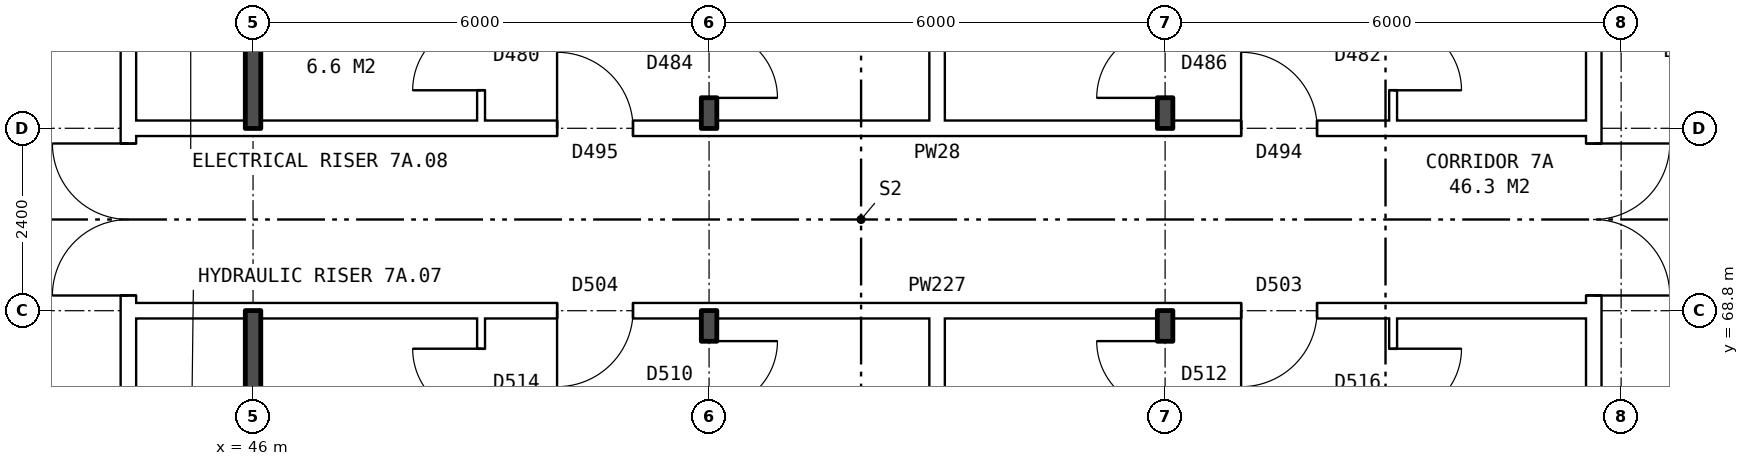
"""IFC4 building model, lengths in metres.
Left out: names, types, materials, properties, quantities, classifications, styles, units other than length and angle.
Written with IfcOpenShell. Run it as: python <this file> out.ifc"""

import sys

from ifc_helpers import new_model, si_unit, direction, frame, frame_2d, origin, place, context, subcontext, project, spatial, rectangle, extrude, element, fill, save


model = new_model("IFC4")
c1 = context("Model", 3, precision=1e-05, world=origin(), true_north=direction((0.0, 1.0)))
c2 = subcontext(c1, "Body", "Model", "MODEL_VIEW")
j1 = project(units=[si_unit("LENGTHUNIT", "METRE"), si_unit("PLANEANGLEUNIT", "RADIAN")], contexts=[c1])
p1 = place(None, origin())
s1 = spatial("IfcSite", under=j1, at=p1, CompositionType="ELEMENT")
p2 = place(p1, origin())
s2 = spatial("IfcBuilding", under=s1, at=p2, CompositionType="ELEMENT")
p3 = place(p2, frame((0.0, 0.0, 28.8)))
s3 = spatial("IfcBuildingStorey", under=s2, at=p3, CompositionType="ELEMENT", Elevation=28.8)
p4 = place(p3, frame((63.64, 63.9, 0.0), z_axis=(0.0, 0.0, 1.0), x_axis=(0.0, 1.0, 0.0)))
e1 = element("IfcWall", 1, at=p4, inside=s3, PredefinedType="PARTITIONING", context=c2, shape_type="SweptSolid", body=[
    extrude(rectangle(XDim=12.2, YDim=0.2, at=frame_2d((6.1, 0.0))), origin(), (0.0, 0.0, 1.0), 2.85),
])
p5 = place(p4, frame((5.1, 0.0, 0.0)))
e2 = element("IfcOpeningElement", 2, at=p5, cuts=e1, PredefinedType="OPENING", context=c2, shape_type="SweptSolid", body=[
    extrude(rectangle(XDim=2.0, YDim=2.1, at=frame_2d((1.0, 1.05))), frame((0.0, 0.11, 0.0), z_axis=(0.0, -1.0, 0.0), x_axis=(1.0, 0.0, 0.0)), (0.0, 0.0, 1.0), 0.22),
])
p6 = place(p3, frame((44.36, 63.9, 0.0), z_axis=(0.0, 0.0, 1.0), x_axis=(0.0, 1.0, 0.0)))
e3 = element("IfcWall", 3, at=p6, inside=s3, PredefinedType="PARTITIONING", context=c2, shape_type="SweptSolid", body=[
    extrude(rectangle(XDim=12.2, YDim=0.2, at=frame_2d((6.1, 0.0))), origin(), (0.0, 0.0, 1.0), 2.85),
])
p7 = place(p6, frame((5.1, 0.0, 0.0)))
e4 = element("IfcOpeningElement", 4, at=p7, cuts=e3, PredefinedType="OPENING", context=c2, shape_type="SweptSolid", body=[
    extrude(rectangle(XDim=2.0, YDim=2.1, at=frame_2d((1.0, 1.05))), frame((0.0, 0.11, 0.0), z_axis=(0.0, -1.0, 0.0), x_axis=(1.0, 0.0, 0.0)), (0.0, 0.0, 1.0), 0.22),
])
p8 = place(p3, frame((44.36, 68.8, 0.0), z_axis=(0.0, 0.0, 1.0), x_axis=(1.0, 0.0, 0.0)))
e5 = element("IfcWall", 5, at=p8, inside=s3, PredefinedType="PARTITIONING", context=c2, shape_type="SweptSolid", body=[
    extrude(rectangle(XDim=19.28, YDim=0.2, at=frame_2d((9.64, 0.0))), origin(), (0.0, 0.0, 1.0), 2.85),
])
p9 = place(p8, frame((14.64, 0.0, 0.0)))
e6 = element("IfcOpeningElement", 6, at=p9, cuts=e5, PredefinedType="OPENING", context=c2, shape_type="SweptSolid", body=[
    extrude(rectangle(XDim=1.0, YDim=2.1, at=frame_2d((0.5, 1.05))), frame((0.0, 0.11, 0.0), z_axis=(0.0, -1.0, 0.0), x_axis=(1.0, 0.0, 0.0)), (0.0, 0.0, 1.0), 0.22),
])
p10 = place(p8, frame((5.64, 0.0, 0.0)))
e7 = element("IfcOpeningElement", 7, at=p10, cuts=e5, PredefinedType="OPENING", context=c2, shape_type="SweptSolid", body=[
    extrude(rectangle(XDim=1.0, YDim=2.1, at=frame_2d((0.5, 1.05))), frame((0.0, 0.11, 0.0), z_axis=(0.0, -1.0, 0.0), x_axis=(1.0, 0.0, 0.0)), (0.0, 0.0, 1.0), 0.22),
])
p11 = place(p3, frame((44.36, 71.2, 0.0), z_axis=(0.0, 0.0, 1.0), x_axis=(1.0, 0.0, 0.0)))
e8 = element("IfcWall", 8, at=p11, inside=s3, PredefinedType="PARTITIONING", context=c2, shape_type="SweptSolid", body=[
    extrude(rectangle(XDim=19.28, YDim=0.2, at=frame_2d((9.64, 0.0))), origin(), (0.0, 0.0, 1.0), 2.85),
])
p12 = place(p11, frame((14.64, 0.0, 0.0)))
e9 = element("IfcOpeningElement", 9, at=p12, cuts=e8, PredefinedType="OPENING", context=c2, shape_type="SweptSolid", body=[
    extrude(rectangle(XDim=1.0, YDim=2.1, at=frame_2d((0.5, 1.05))), frame((0.0, 0.11, 0.0), z_axis=(0.0, -1.0, 0.0), x_axis=(1.0, 0.0, 0.0)), (0.0, 0.0, 1.0), 0.22),
])
p13 = place(p11, frame((5.64, 0.0, 0.0)))
e10 = element("IfcOpeningElement", 10, at=p13, cuts=e8, PredefinedType="OPENING", context=c2, shape_type="SweptSolid", body=[
    extrude(rectangle(XDim=1.0, YDim=2.1, at=frame_2d((0.5, 1.05))), frame((0.0, 0.11, 0.0), z_axis=(0.0, -1.0, 0.0), x_axis=(1.0, 0.0, 0.0)), (0.0, 0.0, 1.0), 0.22),
])
for number, where, z_axis, x_axis in (
    (11, (46.0, 63.8, 0.0), (0.0, 0.0, 1.0), (0.0, 1.0, 0.0)),
    (12, (46.0, 71.2, 0.0), (0.0, 0.0, 1.0), (0.0, 1.0, 0.0)),
):
    element("IfcWall", number, at=place(p3, frame(where, z_axis=z_axis, x_axis=x_axis)), inside=s3, PredefinedType="SOLIDWALL", context=c2, shape_type="SweptSolid", body=[
        extrude(rectangle(XDim=5.0, YDim=0.2, at=frame_2d((2.5, 0.0))), origin(), (0.0, 0.0, 1.0), 2.85),
    ])
p14 = place(p3, frame((49.0, 54.36, 0.0), z_axis=(0.0, 0.0, 1.0), x_axis=(0.0, 1.0, 0.0)))
e13 = element("IfcWall", 13, at=p14, inside=s3, PredefinedType="PARTITIONING", context=c2, shape_type="SweptSolid", body=[
    extrude(rectangle(XDim=14.34, YDim=0.1, at=frame_2d((7.17, 0.0))), origin(), (0.0, 0.0, 1.0), 2.85),
])
p15 = place(p14, frame((4.2, 0.0, 0.0)))
e14 = element("IfcOpeningElement", 14, at=p15, cuts=e13, PredefinedType="OPENING", context=c2, shape_type="SweptSolid", body=[
    extrude(rectangle(XDim=0.9, YDim=2.1, at=frame_2d((0.45, 1.05))), frame((0.0, 0.06, 0.0), z_axis=(0.0, -1.0, 0.0), x_axis=(1.0, 0.0, 0.0)), (0.0, 0.0, 1.0), 0.12),
])
p16 = place(p14, frame((13.04, 0.0, 0.0)))
e15 = element("IfcOpeningElement", 15, at=p16, cuts=e13, PredefinedType="OPENING", context=c2, shape_type="SweptSolid", body=[
    extrude(rectangle(XDim=0.9, YDim=2.1, at=frame_2d((0.45, 1.05))), frame((0.0, 0.06, 0.0), z_axis=(0.0, -1.0, 0.0), x_axis=(1.0, 0.0, 0.0)), (0.0, 0.0, 1.0), 0.12),
])
p17 = place(p3, frame((49.0, 71.3, 0.0), z_axis=(0.0, 0.0, 1.0), x_axis=(0.0, 1.0, 0.0)))
e16 = element("IfcWall", 16, at=p17, inside=s3, PredefinedType="PARTITIONING", context=c2, shape_type="SweptSolid", body=[
    extrude(rectangle(XDim=14.34, YDim=0.1, at=frame_2d((7.17, 0.0))), origin(), (0.0, 0.0, 1.0), 2.85),
])
p18 = place(p17, frame((9.24, 0.0, 0.0)))
e17 = element("IfcOpeningElement", 17, at=p18, cuts=e16, PredefinedType="OPENING", context=c2, shape_type="SweptSolid", body=[
    extrude(rectangle(XDim=0.9, YDim=2.1, at=frame_2d((0.45, 1.05))), frame((0.0, 0.06, 0.0), z_axis=(0.0, -1.0, 0.0), x_axis=(1.0, 0.0, 0.0)), (0.0, 0.0, 1.0), 0.12),
])
p19 = place(p17, frame((0.4, 0.0, 0.0)))
e18 = element("IfcOpeningElement", 18, at=p19, cuts=e16, PredefinedType="OPENING", context=c2, shape_type="SweptSolid", body=[
    extrude(rectangle(XDim=0.9, YDim=2.1, at=frame_2d((0.45, 1.05))), frame((0.0, 0.06, 0.0), z_axis=(0.0, -1.0, 0.0), x_axis=(1.0, 0.0, 0.0)), (0.0, 0.0, 1.0), 0.12),
])
p20 = place(p3, frame((52.0, 54.36, 0.0), z_axis=(0.0, 0.0, 1.0), x_axis=(0.0, 1.0, 0.0)))
e19 = element("IfcWall", 19, at=p20, inside=s3, PredefinedType="SOLIDWALL", context=c2, shape_type="SweptSolid", body=[
    extrude(rectangle(XDim=14.44, YDim=0.2, at=frame_2d((7.22, 0.0))), origin(), (0.0, 0.0, 1.0), 2.85),
])
p21 = place(p20, frame((4.2, 0.0, 0.0)))
e20 = element("IfcOpeningElement", 20, at=p21, cuts=e19, PredefinedType="OPENING", context=c2, shape_type="SweptSolid", body=[
    extrude(rectangle(XDim=0.9, YDim=2.1, at=frame_2d((0.45, 1.05))), frame((0.0, 0.11, 0.0), z_axis=(0.0, -1.0, 0.0), x_axis=(1.0, 0.0, 0.0)), (0.0, 0.0, 1.0), 0.22),
])
p22 = place(p20, frame((13.14, 0.0, 0.0)))
e21 = element("IfcOpeningElement", 21, at=p22, cuts=e19, PredefinedType="OPENING", context=c2, shape_type="SweptSolid", body=[
    extrude(rectangle(XDim=0.9, YDim=2.1, at=frame_2d((0.45, 1.05))), frame((0.0, 0.11, 0.0), z_axis=(0.0, -1.0, 0.0), x_axis=(1.0, 0.0, 0.0)), (0.0, 0.0, 1.0), 0.22),
])
p23 = place(p3, frame((52.0, 71.2, 0.0), z_axis=(0.0, 0.0, 1.0), x_axis=(0.0, 1.0, 0.0)))
e22 = element("IfcWall", 22, at=p23, inside=s3, PredefinedType="SOLIDWALL", context=c2, shape_type="SweptSolid", body=[
    extrude(rectangle(XDim=14.44, YDim=0.2, at=frame_2d((7.22, 0.0))), origin(), (0.0, 0.0, 1.0), 2.85),
])
p24 = place(p23, frame((9.34, 0.0, 0.0)))
e23 = element("IfcOpeningElement", 23, at=p24, cuts=e22, PredefinedType="OPENING", context=c2, shape_type="SweptSolid", body=[
    extrude(rectangle(XDim=0.9, YDim=2.1, at=frame_2d((0.45, 1.05))), frame((0.0, 0.11, 0.0), z_axis=(0.0, -1.0, 0.0), x_axis=(1.0, 0.0, 0.0)), (0.0, 0.0, 1.0), 0.22),
])
p25 = place(p23, frame((0.4, 0.0, 0.0)))
e24 = element("IfcOpeningElement", 24, at=p25, cuts=e22, PredefinedType="OPENING", context=c2, shape_type="SweptSolid", body=[
    extrude(rectangle(XDim=0.9, YDim=2.1, at=frame_2d((0.45, 1.05))), frame((0.0, 0.11, 0.0), z_axis=(0.0, -1.0, 0.0), x_axis=(1.0, 0.0, 0.0)), (0.0, 0.0, 1.0), 0.22),
])
for number, where, z_axis, x_axis in (
    (25, (55.0, 54.36, 0.0), (0.0, 0.0, 1.0), (0.0, 1.0, 0.0)),
    (26, (55.0, 71.3, 0.0), (0.0, 0.0, 1.0), (0.0, 1.0, 0.0)),
):
    element("IfcWall", number, at=place(p3, frame(where, z_axis=z_axis, x_axis=x_axis)), inside=s3, PredefinedType="PARTITIONING", context=c2, shape_type="SweptSolid", body=[
        extrude(rectangle(XDim=14.34, YDim=0.2, at=frame_2d((7.17, 0.0))), origin(), (0.0, 0.0, 1.0), 2.85),
    ])
p26 = place(p3, frame((58.0, 54.36, 0.0), z_axis=(0.0, 0.0, 1.0), x_axis=(0.0, 1.0, 0.0)))
e27 = element("IfcWall", 27, at=p26, inside=s3, PredefinedType="SOLIDWALL", context=c2, shape_type="SweptSolid", body=[
    extrude(rectangle(XDim=14.44, YDim=0.2, at=frame_2d((7.22, 0.0))), origin(), (0.0, 0.0, 1.0), 2.85),
])
p27 = place(p26, frame((4.2, 0.0, 0.0)))
e28 = element("IfcOpeningElement", 28, at=p27, cuts=e27, PredefinedType="OPENING", context=c2, shape_type="SweptSolid", body=[
    extrude(rectangle(XDim=0.9, YDim=2.1, at=frame_2d((0.45, 1.05))), frame((0.0, 0.11, 0.0), z_axis=(0.0, -1.0, 0.0), x_axis=(1.0, 0.0, 0.0)), (0.0, 0.0, 1.0), 0.22),
])
p28 = place(p26, frame((13.14, 0.0, 0.0)))
e29 = element("IfcOpeningElement", 29, at=p28, cuts=e27, PredefinedType="OPENING", context=c2, shape_type="SweptSolid", body=[
    extrude(rectangle(XDim=0.9, YDim=2.1, at=frame_2d((0.45, 1.05))), frame((0.0, 0.11, 0.0), z_axis=(0.0, -1.0, 0.0), x_axis=(1.0, 0.0, 0.0)), (0.0, 0.0, 1.0), 0.22),
])
p29 = place(p3, frame((58.0, 71.2, 0.0), z_axis=(0.0, 0.0, 1.0), x_axis=(0.0, 1.0, 0.0)))
e30 = element("IfcWall", 30, at=p29, inside=s3, PredefinedType="SOLIDWALL", context=c2, shape_type="SweptSolid", body=[
    extrude(rectangle(XDim=14.44, YDim=0.2, at=frame_2d((7.22, 0.0))), origin(), (0.0, 0.0, 1.0), 2.85),
])
p30 = place(p29, frame((6.84, 0.0, 0.0)))
e31 = element("IfcOpeningElement", 31, at=p30, cuts=e30, PredefinedType="OPENING", context=c2, shape_type="SweptSolid", body=[
    extrude(rectangle(XDim=0.9, YDim=2.1, at=frame_2d((0.45, 1.05))), frame((0.0, 0.11, 0.0), z_axis=(0.0, -1.0, 0.0), x_axis=(1.0, 0.0, 0.0)), (0.0, 0.0, 1.0), 0.22),
])
p31 = place(p29, frame((0.4, 0.0, 0.0)))
e32 = element("IfcOpeningElement", 32, at=p31, cuts=e30, PredefinedType="OPENING", context=c2, shape_type="SweptSolid", body=[
    extrude(rectangle(XDim=0.9, YDim=2.1, at=frame_2d((0.45, 1.05))), frame((0.0, 0.11, 0.0), z_axis=(0.0, -1.0, 0.0), x_axis=(1.0, 0.0, 0.0)), (0.0, 0.0, 1.0), 0.22),
])
p32 = place(p3, frame((61.0, 54.36, 0.0), z_axis=(0.0, 0.0, 1.0), x_axis=(0.0, 1.0, 0.0)))
e33 = element("IfcWall", 33, at=p32, inside=s3, PredefinedType="PARTITIONING", context=c2, shape_type="SweptSolid", body=[
    extrude(rectangle(XDim=14.34, YDim=0.1, at=frame_2d((7.17, 0.0))), origin(), (0.0, 0.0, 1.0), 2.85),
])
p33 = place(p32, frame((4.2, 0.0, 0.0)))
e34 = element("IfcOpeningElement", 34, at=p33, cuts=e33, PredefinedType="OPENING", context=c2, shape_type="SweptSolid", body=[
    extrude(rectangle(XDim=0.9, YDim=2.1, at=frame_2d((0.45, 1.05))), frame((0.0, 0.06, 0.0), z_axis=(0.0, -1.0, 0.0), x_axis=(1.0, 0.0, 0.0)), (0.0, 0.0, 1.0), 0.12),
])
p34 = place(p32, frame((13.04, 0.0, 0.0)))
e35 = element("IfcOpeningElement", 35, at=p34, cuts=e33, PredefinedType="OPENING", context=c2, shape_type="SweptSolid", body=[
    extrude(rectangle(XDim=0.9, YDim=2.1, at=frame_2d((0.45, 1.05))), frame((0.0, 0.06, 0.0), z_axis=(0.0, -1.0, 0.0), x_axis=(1.0, 0.0, 0.0)), (0.0, 0.0, 1.0), 0.12),
])
p35 = place(p3, frame((61.0, 71.3, 0.0), z_axis=(0.0, 0.0, 1.0), x_axis=(0.0, 1.0, 0.0)))
e36 = element("IfcWall", 36, at=p35, inside=s3, PredefinedType="PARTITIONING", context=c2, shape_type="SweptSolid", body=[
    extrude(rectangle(XDim=14.34, YDim=0.1, at=frame_2d((7.17, 0.0))), origin(), (0.0, 0.0, 1.0), 2.85),
])
p36 = place(p35, frame((6.74, 0.0, 0.0)))
e37 = element("IfcOpeningElement", 37, at=p36, cuts=e36, PredefinedType="OPENING", context=c2, shape_type="SweptSolid", body=[
    extrude(rectangle(XDim=0.9, YDim=2.1, at=frame_2d((0.45, 1.05))), frame((0.0, 0.06, 0.0), z_axis=(0.0, -1.0, 0.0), x_axis=(1.0, 0.0, 0.0)), (0.0, 0.0, 1.0), 0.12),
])
p37 = place(p35, frame((0.4, 0.0, 0.0)))
e38 = element("IfcOpeningElement", 38, at=p37, cuts=e36, PredefinedType="OPENING", context=c2, shape_type="SweptSolid", body=[
    extrude(rectangle(XDim=0.9, YDim=2.1, at=frame_2d((0.45, 1.05))), frame((0.0, 0.06, 0.0), z_axis=(0.0, -1.0, 0.0), x_axis=(1.0, 0.0, 0.0)), (0.0, 0.0, 1.0), 0.12),
])
p38 = place(p5, frame((2.0, 0.0, 0.0), z_axis=(0.0, 0.0, 1.0), x_axis=(-1.0, 0.0, 0.0)))
e39 = element("IfcDoor", 39, at=p38, inside=s3, OperationType="DOUBLE_DOOR_SINGLE_SWING", PredefinedType="DOOR", context=c2, shape_type="SweptSolid", body=[
    extrude(rectangle(XDim=2.0, YDim=2.1, at=frame_2d((1.0, 1.05))), frame((0.0, 0.025, 0.0), z_axis=(0.0, -1.0, 0.0), x_axis=(1.0, 0.0, 0.0)), (0.0, 0.0, 1.0), 0.05),
])
fill(e2, e39)
p39 = place(p7, origin())
e40 = element("IfcDoor", 40, at=p39, inside=s3, OperationType="DOUBLE_DOOR_SINGLE_SWING", PredefinedType="DOOR", context=c2, shape_type="SweptSolid", body=[
    extrude(rectangle(XDim=2.0, YDim=2.1, at=frame_2d((1.0, 1.05))), frame((0.0, 0.025, 0.0), z_axis=(0.0, -1.0, 0.0), x_axis=(1.0, 0.0, 0.0)), (0.0, 0.0, 1.0), 0.05),
])
fill(e4, e40)
p40 = place(p9, frame((1.0, 0.0, 0.0), z_axis=(0.0, 0.0, 1.0), x_axis=(-1.0, 0.0, 0.0)))
e41 = element("IfcDoor", 41, at=p40, inside=s3, OperationType="SINGLE_SWING_RIGHT", PredefinedType="DOOR", context=c2, shape_type="SweptSolid", body=[
    extrude(rectangle(XDim=1.0, YDim=2.1, at=frame_2d((0.5, 1.05))), frame((0.0, 0.025, 0.0), z_axis=(0.0, -1.0, 0.0), x_axis=(1.0, 0.0, 0.0)), (0.0, 0.0, 1.0), 0.05),
])
fill(e6, e41)
p41 = place(p34, frame((0.9, 0.0, 0.0), z_axis=(0.0, 0.0, 1.0), x_axis=(-1.0, 0.0, 0.0)))
e42 = element("IfcDoor", 42, at=p41, inside=s3, OperationType="SINGLE_SWING_LEFT", PredefinedType="DOOR", context=c2, shape_type="SweptSolid", body=[
    extrude(rectangle(XDim=0.9, YDim=2.1, at=frame_2d((0.45, 1.05))), frame((0.0, 0.025, 0.0), z_axis=(0.0, -1.0, 0.0), x_axis=(1.0, 0.0, 0.0)), (0.0, 0.0, 1.0), 0.05),
])
fill(e35, e42)
p42 = place(p28, origin())
e43 = element("IfcDoor", 43, at=p42, inside=s3, OperationType="SINGLE_SWING_RIGHT", PredefinedType="DOOR", context=c2, shape_type="SweptSolid", body=[
    extrude(rectangle(XDim=0.9, YDim=2.1, at=frame_2d((0.45, 1.05))), frame((0.0, 0.025, 0.0), z_axis=(0.0, -1.0, 0.0), x_axis=(1.0, 0.0, 0.0)), (0.0, 0.0, 1.0), 0.05),
])
fill(e29, e43)
p43 = place(p10, frame((1.0, 0.0, 0.0), z_axis=(0.0, 0.0, 1.0), x_axis=(-1.0, 0.0, 0.0)))
e44 = element("IfcDoor", 44, at=p43, inside=s3, OperationType="SINGLE_SWING_RIGHT", PredefinedType="DOOR", context=c2, shape_type="SweptSolid", body=[
    extrude(rectangle(XDim=1.0, YDim=2.1, at=frame_2d((0.5, 1.05))), frame((0.0, 0.025, 0.0), z_axis=(0.0, -1.0, 0.0), x_axis=(1.0, 0.0, 0.0)), (0.0, 0.0, 1.0), 0.05),
])
fill(e7, e44)
p44 = place(p22, frame((0.9, 0.0, 0.0), z_axis=(0.0, 0.0, 1.0), x_axis=(-1.0, 0.0, 0.0)))
e45 = element("IfcDoor", 45, at=p44, inside=s3, OperationType="SINGLE_SWING_LEFT", PredefinedType="DOOR", context=c2, shape_type="SweptSolid", body=[
    extrude(rectangle(XDim=0.9, YDim=2.1, at=frame_2d((0.45, 1.05))), frame((0.0, 0.025, 0.0), z_axis=(0.0, -1.0, 0.0), x_axis=(1.0, 0.0, 0.0)), (0.0, 0.0, 1.0), 0.05),
])
fill(e21, e45)
p45 = place(p16, origin())
e46 = element("IfcDoor", 46, at=p45, inside=s3, OperationType="SINGLE_SWING_RIGHT", PredefinedType="DOOR", context=c2, shape_type="SweptSolid", body=[
    extrude(rectangle(XDim=0.9, YDim=2.1, at=frame_2d((0.45, 1.05))), frame((0.0, 0.025, 0.0), z_axis=(0.0, -1.0, 0.0), x_axis=(1.0, 0.0, 0.0)), (0.0, 0.0, 1.0), 0.05),
])
fill(e15, e46)
p46 = place(p12, origin())
e47 = element("IfcDoor", 47, at=p46, inside=s3, OperationType="SINGLE_SWING_LEFT", PredefinedType="DOOR", context=c2, shape_type="SweptSolid", body=[
    extrude(rectangle(XDim=1.0, YDim=2.1, at=frame_2d((0.5, 1.05))), frame((0.0, 0.025, 0.0), z_axis=(0.0, -1.0, 0.0), x_axis=(1.0, 0.0, 0.0)), (0.0, 0.0, 1.0), 0.05),
])
fill(e9, e47)
p47 = place(p37, frame((0.9, 0.0, 0.0), z_axis=(0.0, 0.0, 1.0), x_axis=(-1.0, 0.0, 0.0)))
e48 = element("IfcDoor", 48, at=p47, inside=s3, OperationType="SINGLE_SWING_RIGHT", PredefinedType="DOOR", context=c2, shape_type="SweptSolid", body=[
    extrude(rectangle(XDim=0.9, YDim=2.1, at=frame_2d((0.45, 1.05))), frame((0.0, 0.025, 0.0), z_axis=(0.0, -1.0, 0.0), x_axis=(1.0, 0.0, 0.0)), (0.0, 0.0, 1.0), 0.05),
])
fill(e38, e48)
p48 = place(p31, origin())
e49 = element("IfcDoor", 49, at=p48, inside=s3, OperationType="SINGLE_SWING_LEFT", PredefinedType="DOOR", context=c2, shape_type="SweptSolid", body=[
    extrude(rectangle(XDim=0.9, YDim=2.1, at=frame_2d((0.45, 1.05))), frame((0.0, 0.025, 0.0), z_axis=(0.0, -1.0, 0.0), x_axis=(1.0, 0.0, 0.0)), (0.0, 0.0, 1.0), 0.05),
])
fill(e32, e49)
p49 = place(p13, origin())
e50 = element("IfcDoor", 50, at=p49, inside=s3, OperationType="SINGLE_SWING_LEFT", PredefinedType="DOOR", context=c2, shape_type="SweptSolid", body=[
    extrude(rectangle(XDim=1.0, YDim=2.1, at=frame_2d((0.5, 1.05))), frame((0.0, 0.025, 0.0), z_axis=(0.0, -1.0, 0.0), x_axis=(1.0, 0.0, 0.0)), (0.0, 0.0, 1.0), 0.05),
])
fill(e10, e50)
p50 = place(p25, frame((0.9, 0.0, 0.0), z_axis=(0.0, 0.0, 1.0), x_axis=(-1.0, 0.0, 0.0)))
e51 = element("IfcDoor", 51, at=p50, inside=s3, OperationType="SINGLE_SWING_RIGHT", PredefinedType="DOOR", context=c2, shape_type="SweptSolid", body=[
    extrude(rectangle(XDim=0.9, YDim=2.1, at=frame_2d((0.45, 1.05))), frame((0.0, 0.025, 0.0), z_axis=(0.0, -1.0, 0.0), x_axis=(1.0, 0.0, 0.0)), (0.0, 0.0, 1.0), 0.05),
])
fill(e24, e51)
p51 = place(p19, origin())
e52 = element("IfcDoor", 52, at=p51, inside=s3, OperationType="SINGLE_SWING_LEFT", PredefinedType="DOOR", context=c2, shape_type="SweptSolid", body=[
    extrude(rectangle(XDim=0.9, YDim=2.1, at=frame_2d((0.45, 1.05))), frame((0.0, 0.025, 0.0), z_axis=(0.0, -1.0, 0.0), x_axis=(1.0, 0.0, 0.0)), (0.0, 0.0, 1.0), 0.05),
])
fill(e18, e52)
save(model, sys.argv[1])
